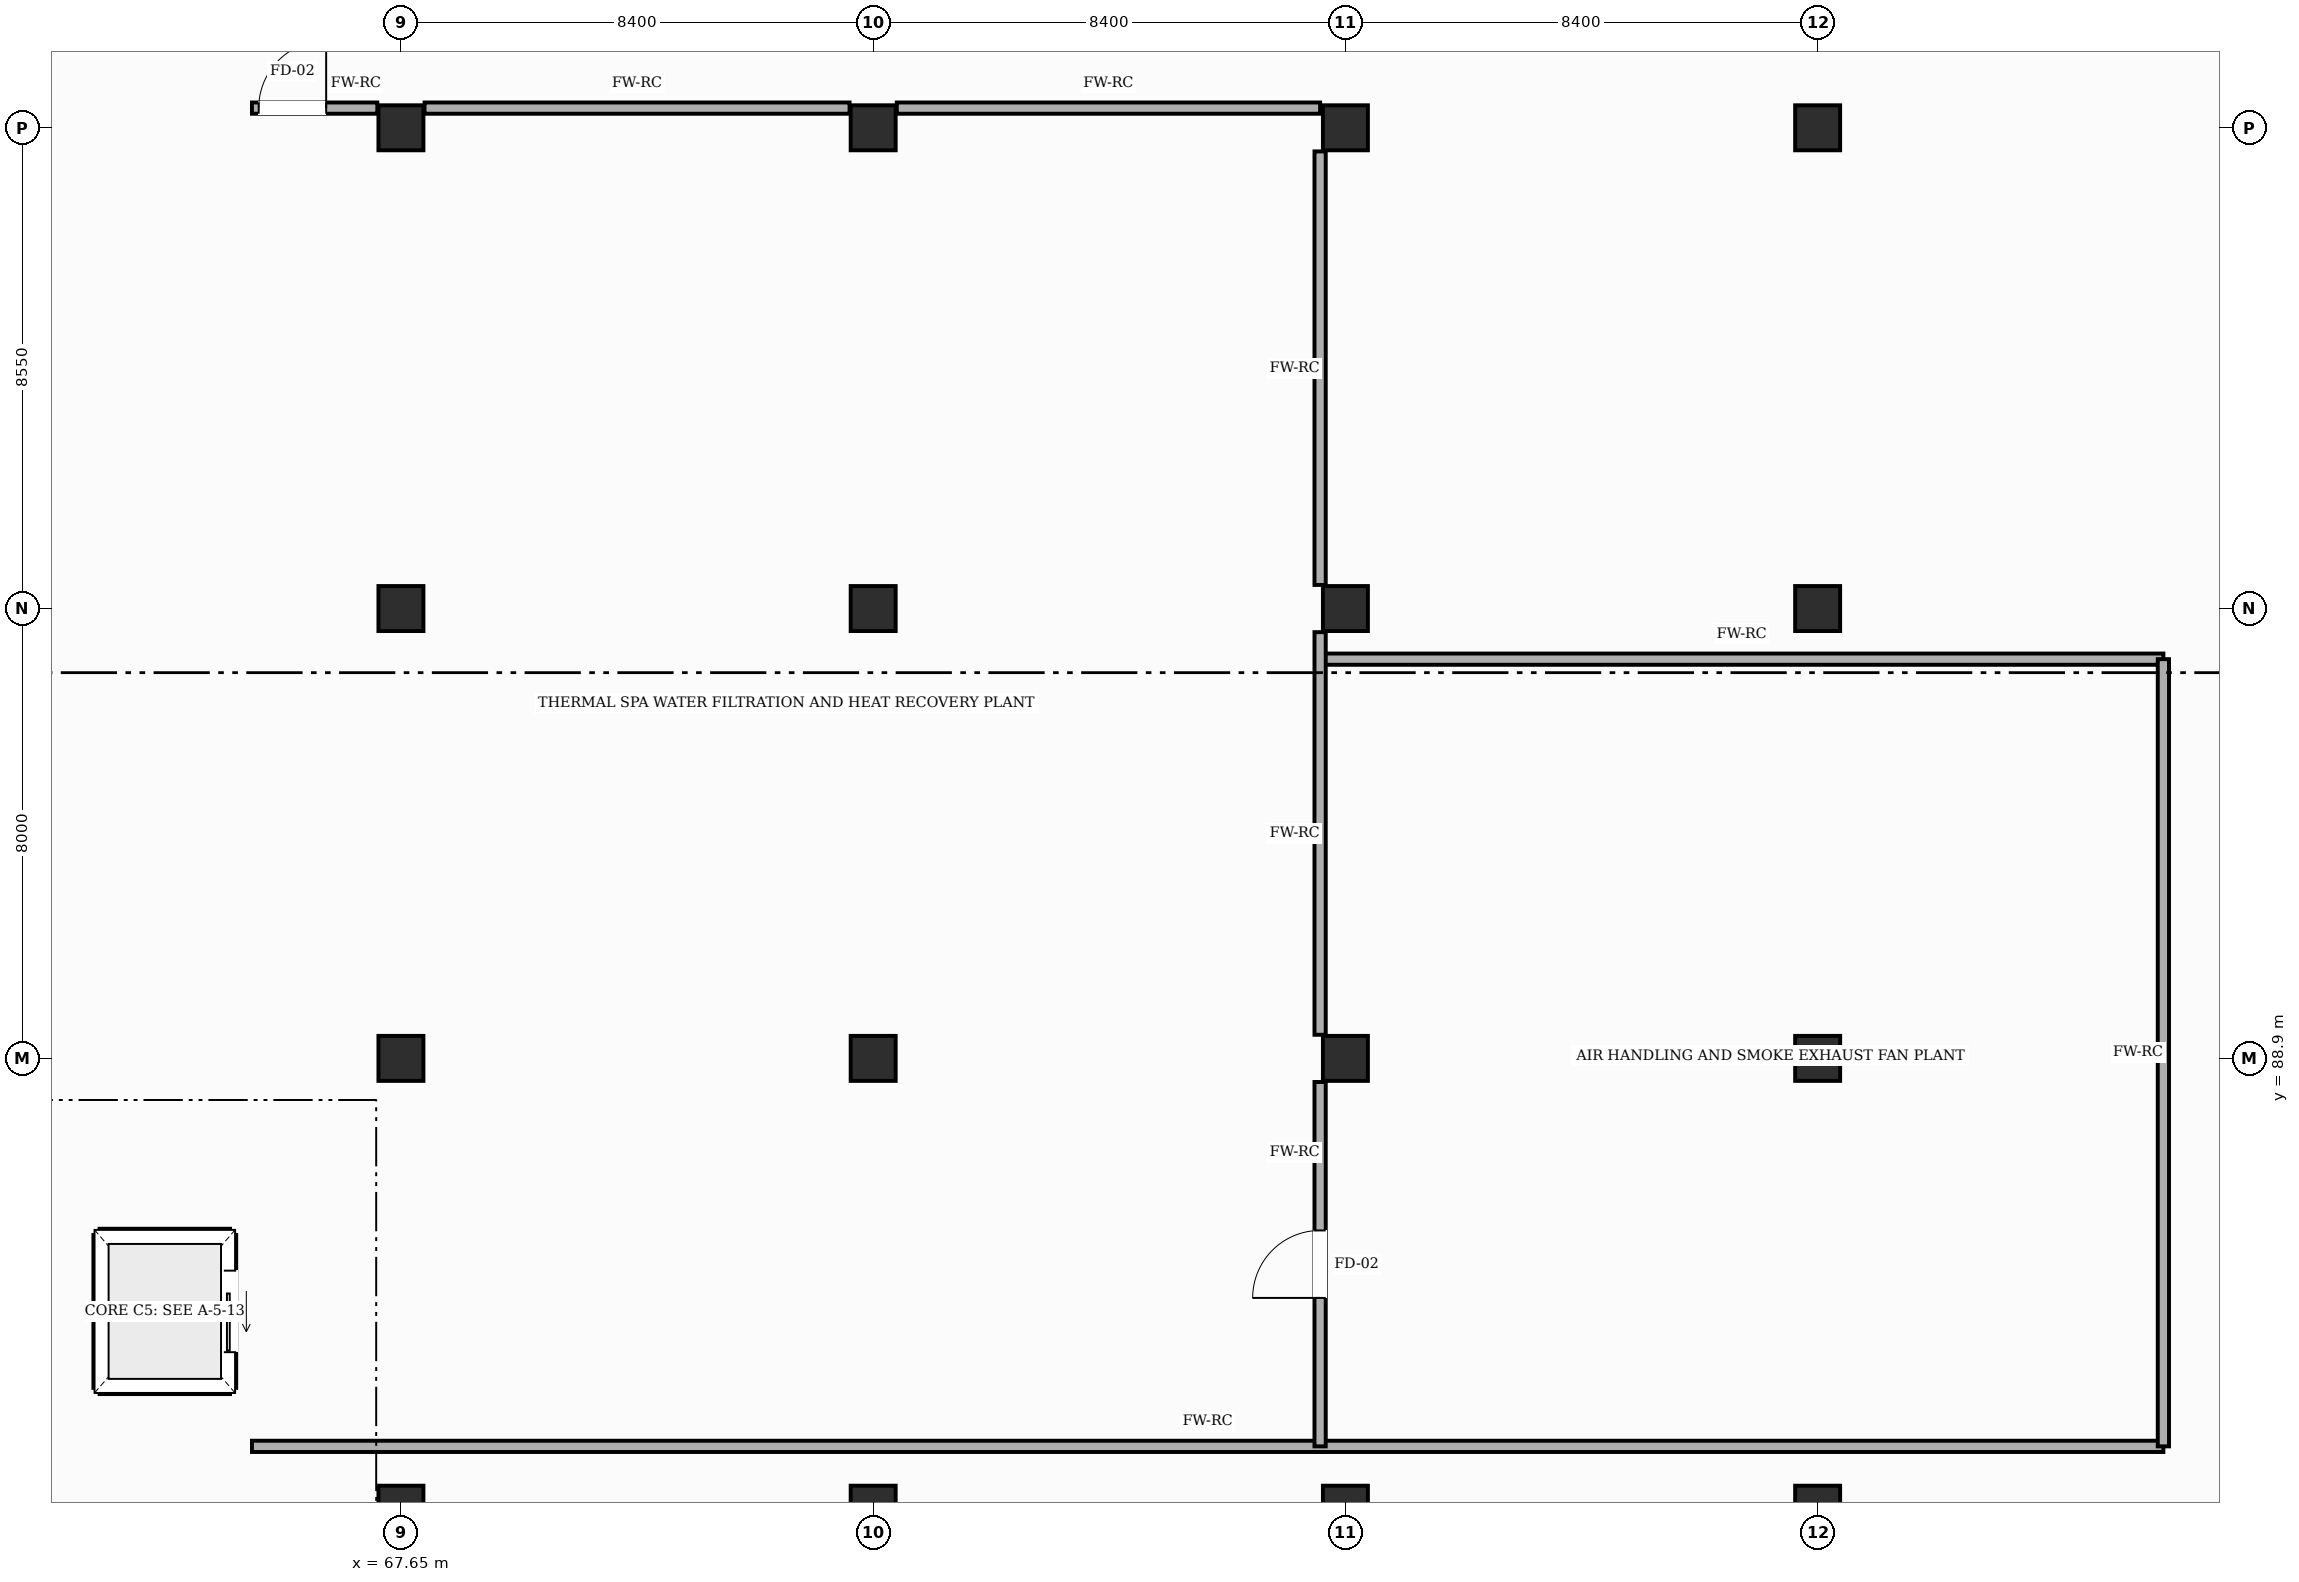
"""IFC4 building model, lengths in metres.
Left out: names, types, materials, properties, quantities, classifications, styles, units other than length and angle.
Written with IfcOpenShell. Run it as: python <this file> out.ifc"""

import sys

from ifc_helpers import new_model, si_unit, direction, frame, frame_2d, origin, origin_2d, place, context, subcontext, project, spatial, rectangle, hollow_rectangle, extrude, element, fill, save


model = new_model("IFC4")
c1 = context("Model", 3, precision=1e-05, world=origin(), true_north=direction((0.0, 1.0)))
c2 = subcontext(c1, "Body", "Model", "MODEL_VIEW")
j1 = project(units=[si_unit("LENGTHUNIT", "METRE"), si_unit("PLANEANGLEUNIT", "RADIAN")], contexts=[c1])
p1 = place(None, origin())
s1 = spatial("IfcSite", under=j1, at=p1, CompositionType="ELEMENT")
p2 = place(p1, origin())
s2 = spatial("IfcBuilding", under=s1, at=p2, CompositionType="ELEMENT")
p3 = place(p2, frame((0.0, 0.0, -5.4)))
s3 = spatial("IfcBuildingStorey", under=s2, at=p3, CompositionType="ELEMENT", Elevation=-5.4)
for number, where, z_axis, x_axis in (
    (1, (67.65, 80.9, 0.0), (0.0, 0.0, 1.0), (1.0, 0.0, 0.0)),
    (2, (67.65, 88.9, 0.0), (0.0, 0.0, 1.0), (1.0, 0.0, 0.0)),
    (3, (67.65, 96.9, 0.0), (0.0, 0.0, 1.0), (1.0, 0.0, 0.0)),
    (4, (67.65, 105.45, 0.0), (0.0, 0.0, 1.0), (1.0, 0.0, 0.0)),
    (5, (76.05, 80.9, 0.0), (0.0, 0.0, 1.0), (1.0, 0.0, 0.0)),
    (6, (76.05, 88.9, 0.0), (0.0, 0.0, 1.0), (1.0, 0.0, 0.0)),
    (7, (76.05, 96.9, 0.0), (0.0, 0.0, 1.0), (1.0, 0.0, 0.0)),
    (8, (76.05, 105.45, 0.0), (0.0, 0.0, 1.0), (1.0, 0.0, 0.0)),
    (9, (84.45, 80.9, 0.0), (0.0, 0.0, 1.0), (1.0, 0.0, 0.0)),
    (10, (84.45, 88.9, 0.0), (0.0, 0.0, 1.0), (1.0, 0.0, 0.0)),
    (11, (84.45, 96.9, 0.0), (0.0, 0.0, 1.0), (1.0, 0.0, 0.0)),
    (12, (84.45, 105.45, 0.0), (0.0, 0.0, 1.0), (1.0, 0.0, 0.0)),
    (13, (92.85, 80.9, 0.0), (0.0, 0.0, 1.0), (1.0, 0.0, 0.0)),
    (14, (92.85, 88.9, 0.0), (0.0, 0.0, 1.0), (1.0, 0.0, 0.0)),
    (15, (92.85, 96.9, 0.0), (0.0, 0.0, 1.0), (1.0, 0.0, 0.0)),
    (16, (92.85, 105.45, 0.0), (0.0, 0.0, 1.0), (1.0, 0.0, 0.0)),
):
    element("IfcColumn", number, at=place(p3, frame(where, z_axis=z_axis, x_axis=x_axis)), inside=s3, PredefinedType="COLUMN", context=c2, shape_type="SweptSolid", body=[
        extrude(hollow_rectangle(XDim=0.8, YDim=0.8, WallThickness=0.032, InnerFilletRadius=0.032, OuterFilletRadius=0.064, at=origin_2d()), origin(), (0.0, 0.0, 1.0), 5.4),
    ])
for number, where, z_axis, x_axis in (
    (17, (62.29, 85.76, 0.0), (0.0, 0.0, 1.0), (1.0, 0.0, 0.0)),
    (18, (62.29, 83.04, 0.0), (0.0, 0.0, 1.0), (1.0, 0.0, 0.0)),
):
    element("IfcWall", number, at=place(p3, frame(where, z_axis=z_axis, x_axis=x_axis)), inside=s3, PredefinedType="SHEAR", context=c2, shape_type="SweptSolid", body=[
        extrude(rectangle(XDim=2.32, YDim=0.22, at=frame_2d((1.16, 0.0))), origin(), (0.0, 0.0, 1.0), 5.12),
    ])
p4 = place(p3, frame((64.61, 83.04, 0.0), z_axis=(0.0, 0.0, 1.0), x_axis=(0.0, 1.0, 0.0)))
e19 = element("IfcWall", 19, at=p4, inside=s3, PredefinedType="SHEAR", context=c2, shape_type="SweptSolid", body=[
    extrude(rectangle(XDim=2.72, YDim=0.22, at=frame_2d((1.36, 0.0))), origin(), (0.0, 0.0, 1.0), 5.12),
])
p5 = place(p4, frame((0.635, 0.0, 0.0)))
e20 = element("IfcOpeningElement", 20, at=p5, cuts=e19, PredefinedType="OPENING", context=c2, shape_type="SweptSolid", body=[
    extrude(rectangle(XDim=1.45, YDim=2.35, at=frame_2d((0.725, 1.175))), frame((0.0, 0.12, 0.0), z_axis=(0.0, -1.0, 0.0), x_axis=(1.0, 0.0, 0.0)), (0.0, 0.0, 1.0), 0.24),
])
p6 = place(p3, frame((62.29, 83.04, 0.0), z_axis=(0.0, 0.0, 1.0), x_axis=(0.0, 1.0, 0.0)))
e21 = element("IfcWall", 21, at=p6, inside=s3, PredefinedType="SHEAR", context=c2, shape_type="SweptSolid", body=[
    extrude(rectangle(XDim=2.72, YDim=0.22, at=frame_2d((1.36, 0.0))), origin(), (0.0, 0.0, 1.0), 5.12),
])
p7 = place(p3, frame((65.0, 82.0, 0.0), z_axis=(0.0, 0.0, 1.0), x_axis=(1.0, 0.0, 0.0)))
e22 = element("IfcWall", 22, at=p7, inside=s3, PredefinedType="SOLIDWALL", context=c2, shape_type="SweptSolid", body=[
    extrude(rectangle(XDim=34.0, YDim=0.2, at=frame_2d((17.0, 0.0))), origin(), (0.0, 0.0, 1.0), 5.105),
])
p8 = place(p3, frame((84.0, 96.0, 0.0), z_axis=(0.0, 0.0, 1.0), x_axis=(1.0, 0.0, 0.0)))
e23 = element("IfcWall", 23, at=p8, inside=s3, PredefinedType="SOLIDWALL", context=c2, shape_type="SweptSolid", body=[
    extrude(rectangle(XDim=15.0, YDim=0.2, at=frame_2d((7.5, 0.0))), origin(), (0.0, 0.0, 1.0), 5.105),
])
p9 = place(p3, frame((65.0, 105.8, 0.0), z_axis=(0.0, 0.0, 1.0), x_axis=(1.0, 0.0, 0.0)))
e24 = element("IfcWall", 24, at=p9, inside=s3, PredefinedType="SOLIDWALL", context=c2, shape_type="SweptSolid", body=[
    extrude(rectangle(XDim=2.23, YDim=0.2, at=frame_2d((1.115, 0.0))), origin(), (0.0, 0.0, 1.0), 4.395),
])
p10 = place(p9, frame((0.12, 0.0, 0.0)))
e25 = element("IfcOpeningElement", 25, at=p10, cuts=e24, PredefinedType="OPENING", context=c2, shape_type="SweptSolid", body=[
    extrude(rectangle(XDim=1.2, YDim=2.2, at=frame_2d((0.6, 1.1))), frame((0.0, 0.11, 0.0), z_axis=(0.0, -1.0, 0.0), x_axis=(1.0, 0.0, 0.0)), (0.0, 0.0, 1.0), 0.22),
])
p11 = place(p3, frame((68.07, 105.8, 0.0), z_axis=(0.0, 0.0, 1.0), x_axis=(1.0, 0.0, 0.0)))
e26 = element("IfcWall", 26, at=p11, inside=s3, PredefinedType="SOLIDWALL", context=c2, shape_type="SweptSolid", body=[
    extrude(rectangle(XDim=7.56, YDim=0.2, at=frame_2d((3.78, 0.0))), origin(), (0.0, 0.0, 1.0), 4.395),
])
p12 = place(p3, frame((76.47, 105.8, 0.0), z_axis=(0.0, 0.0, 1.0), x_axis=(1.0, 0.0, 0.0)))
e27 = element("IfcWall", 27, at=p12, inside=s3, PredefinedType="SOLIDWALL", context=c2, shape_type="SweptSolid", body=[
    extrude(rectangle(XDim=7.53, YDim=0.2, at=frame_2d((3.765, 0.0))), origin(), (0.0, 0.0, 1.0), 4.395),
])
p13 = place(p3, frame((84.0, 82.0, 0.0), z_axis=(0.0, 0.0, 1.0), x_axis=(0.0, 1.0, 0.0)))
e28 = element("IfcWall", 28, at=p13, inside=s3, PredefinedType="SOLIDWALL", context=c2, shape_type="SweptSolid", body=[
    extrude(rectangle(XDim=6.48, YDim=0.2, at=frame_2d((3.24, 0.0))), origin(), (0.0, 0.0, 1.0), 5.105),
])
p14 = place(p13, frame((2.64, 0.0, 0.0)))
e29 = element("IfcOpeningElement", 29, at=p14, cuts=e28, PredefinedType="OPENING", context=c2, shape_type="SweptSolid", body=[
    extrude(rectangle(XDim=1.2, YDim=2.2, at=frame_2d((0.6, 1.1))), frame((0.0, 0.11, 0.0), z_axis=(0.0, -1.0, 0.0), x_axis=(1.0, 0.0, 0.0)), (0.0, 0.0, 1.0), 0.22),
])
p15 = place(p3, frame((84.0, 89.32, 0.0), z_axis=(0.0, 0.0, 1.0), x_axis=(0.0, 1.0, 0.0)))
e30 = element("IfcWall", 30, at=p15, inside=s3, PredefinedType="SOLIDWALL", context=c2, shape_type="SweptSolid", body=[
    extrude(rectangle(XDim=7.16, YDim=0.2, at=frame_2d((3.58, 0.0))), origin(), (0.0, 0.0, 1.0), 5.105),
])
p16 = place(p3, frame((84.0, 97.32, 0.0), z_axis=(0.0, 0.0, 1.0), x_axis=(0.0, 1.0, 0.0)))
e31 = element("IfcWall", 31, at=p16, inside=s3, PredefinedType="SOLIDWALL", context=c2, shape_type="SweptSolid", body=[
    extrude(rectangle(XDim=7.71, YDim=0.2, at=frame_2d((3.855, 0.0))), origin(), (0.0, 0.0, 1.0), 5.105),
])
p17 = place(p3, frame((99.0, 82.0, 0.0), z_axis=(0.0, 0.0, 1.0), x_axis=(0.0, 1.0, 0.0)))
e32 = element("IfcWall", 32, at=p17, inside=s3, PredefinedType="SOLIDWALL", context=c2, shape_type="SweptSolid", body=[
    extrude(rectangle(XDim=14.0, YDim=0.2, at=frame_2d((7.0, 0.0))), origin(), (0.0, 0.0, 1.0), 5.105),
])
p18 = place(p5, origin())
e33 = element("IfcDoor", 33, at=p18, inside=s3, OperationType="SLIDING_TO_LEFT", PredefinedType="DOOR", context=c2, shape_type="SweptSolid", body=[
    extrude(rectangle(XDim=1.45, YDim=2.35, at=frame_2d((0.725, 1.175))), frame((0.0, 0.025, 0.0), z_axis=(0.0, -1.0, 0.0), x_axis=(1.0, 0.0, 0.0)), (0.0, 0.0, 1.0), 0.05),
])
fill(e20, e33)
p19 = place(p10, origin())
e34 = element("IfcDoor", 34, at=p19, inside=s3, OperationType="SINGLE_SWING_RIGHT", PredefinedType="DOOR", context=c2, shape_type="SweptSolid", body=[
    extrude(rectangle(XDim=1.2, YDim=2.2, at=frame_2d((0.6, 1.1))), frame((0.0, 0.025, 0.0), z_axis=(0.0, -1.0, 0.0), x_axis=(1.0, 0.0, 0.0)), (0.0, 0.0, 1.0), 0.05),
])
fill(e25, e34)
p20 = place(p14, origin())
e35 = element("IfcDoor", 35, at=p20, inside=s3, OperationType="SINGLE_SWING_LEFT", PredefinedType="DOOR", context=c2, shape_type="SweptSolid", body=[
    extrude(rectangle(XDim=1.2, YDim=2.2, at=frame_2d((0.6, 1.1))), frame((0.0, 0.025, 0.0), z_axis=(0.0, -1.0, 0.0), x_axis=(1.0, 0.0, 0.0)), (0.0, 0.0, 1.0), 0.05),
])
fill(e29, e35)
save(model, sys.argv[1])
